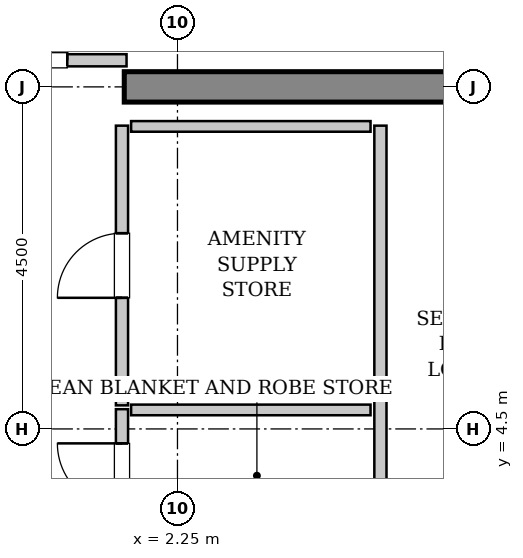
"""IFC4 building model, lengths in metres.
Left out: names, types, materials, properties, quantities, classifications, styles, units other than length and angle.
Written with IfcOpenShell. Run it as: python <this file> out.ifc"""

import sys

from ifc_helpers import new_model, si_unit, direction, frame, frame_2d, origin, place, context, subcontext, project, spatial, rectangle, extrude, source, transform, mapped, element, fill, save


model = new_model("IFC4")
c1 = context("Model", 3, precision=1e-05, world=origin(), true_north=direction((0.0, 1.0)))
c2 = subcontext(c1, "Body", "Model", "MODEL_VIEW")
j1 = project(units=[si_unit("LENGTHUNIT", "METRE"), si_unit("PLANEANGLEUNIT", "RADIAN")], contexts=[c1])
p1 = place(None, origin())
s1 = spatial("IfcSite", under=j1, at=p1, CompositionType="ELEMENT")
p2 = place(p1, origin())
s2 = spatial("IfcBuilding", under=s1, at=p2, CompositionType="ELEMENT")
p3 = place(p2, frame((0.0, 0.0, 345.2)))
s3 = spatial("IfcBuildingStorey", under=s2, at=p3, CompositionType="ELEMENT", Elevation=345.2)
m1 = source(origin(), c2, "Body", "SweptSolid", [
    extrude(rectangle(XDim=9.9, YDim=0.4, at=frame_2d((4.95, 0.0))), origin(), (0.0, 0.0, 1.0), 3.8),
])
p4 = place(p3, frame((1.55, 9.0, 0.0), z_axis=(0.0, 0.0, 1.0), x_axis=(1.0, 0.0, 0.0)))
e1 = element("IfcWall", 1, at=p4, inside=s3, PredefinedType="SHEAR", context=c2, shape_type="MappedRepresentation", body=[
    mapped(m1, transform((0.0, 0.0, 0.0), x_axis=(1.0, 0.0, 0.0), y_axis=(0.0, 1.0, 0.0), z_axis=(0.0, 0.0, 1.0), scale=1.0)),
])
m2 = source(origin(), c2, "Body", "SweptSolid", [
    extrude(rectangle(XDim=3.16, YDim=0.16, at=frame_2d((1.58, 0.0))), origin(), (0.0, 0.0, 1.0), 2.575),
])
p5 = place(p3, frame((-1.58, 9.35, 0.0), z_axis=(0.0, 0.0, 1.0), x_axis=(1.0, 0.0, 0.0)))
e2 = element("IfcWall", 2, at=p5, inside=s3, PredefinedType="PARTITIONING", context=c2, shape_type="MappedRepresentation", body=[
    mapped(m2, transform((0.0, 0.0, 0.0), x_axis=(1.0, 0.0, 0.0), y_axis=(0.0, 1.0, 0.0), z_axis=(0.0, 0.0, 1.0), scale=1.0)),
])
p6 = place(p5, frame((0.78, 0.0, 0.0)))
e3 = element("IfcOpeningElement", 3, at=p6, cuts=e2, PredefinedType="OPENING", context=c2, shape_type="SweptSolid", body=[
    extrude(rectangle(XDim=1.6, YDim=2.3, at=frame_2d((0.8, 1.15))), frame((0.0, 0.09, 0.0), z_axis=(0.0, -1.0, 0.0), x_axis=(1.0, 0.0, 0.0)), (0.0, 0.0, 1.0), 0.18),
])
m3 = source(origin(), c2, "Body", "SweptSolid", [
    extrude(rectangle(XDim=5.45, YDim=0.16, at=frame_2d((2.725, 0.0))), origin(), (0.0, 0.0, 1.0), 3.485),
])
p7 = place(p3, frame((4.92, 3.04, 0.0), z_axis=(0.0, 0.0, 1.0), x_axis=(0.0, 1.0, 0.0)))
e4 = element("IfcWall", 4, at=p7, inside=s3, PredefinedType="PARTITIONING", context=c2, shape_type="MappedRepresentation", body=[
    mapped(m3, transform((0.0, 0.0, 0.0), x_axis=(1.0, 0.0, 0.0), y_axis=(0.0, 1.0, 0.0), z_axis=(0.0, 0.0, 1.0), scale=1.0)),
])
m4 = source(origin(), c2, "Body", "SweptSolid", [
    extrude(rectangle(XDim=1.75, YDim=0.16, at=frame_2d((0.875, 0.0))), origin(), (0.0, 0.0, 1.0), 3.485),
])
p8 = place(p3, frame((1.52, 3.01, 0.0), z_axis=(0.0, 0.0, 1.0), x_axis=(0.0, 1.0, 0.0)))
e5 = element("IfcWall", 5, at=p8, inside=s3, PredefinedType="PARTITIONING", context=c2, shape_type="MappedRepresentation", body=[
    mapped(m4, transform((0.0, 0.0, 0.0), x_axis=(1.0, 0.0, 0.0), y_axis=(0.0, 1.0, 0.0), z_axis=(0.0, 0.0, 1.0), scale=1.0)),
])
p9 = place(p8, frame((0.45, 0.0, 0.0)))
e6 = element("IfcOpeningElement", 6, at=p9, cuts=e5, PredefinedType="OPENING", context=c2, shape_type="SweptSolid", body=[
    extrude(rectangle(XDim=0.85, YDim=2.1, at=frame_2d((0.425, 1.05))), frame((0.0, 0.09, 0.0), z_axis=(0.0, -1.0, 0.0), x_axis=(1.0, 0.0, 0.0)), (0.0, 0.0, 1.0), 0.18),
])
m5 = source(origin(), c2, "Body", "SweptSolid", [
    extrude(rectangle(XDim=3.15, YDim=0.14, at=frame_2d((1.575, 0.0))), origin(), (0.0, 0.0, 1.0), 3.485),
])
p10 = place(p3, frame((1.64, 4.75, 0.0), z_axis=(0.0, 0.0, 1.0), x_axis=(1.0, 0.0, 0.0)))
e7 = element("IfcWall", 7, at=p10, inside=s3, PredefinedType="PARTITIONING", context=c2, shape_type="MappedRepresentation", body=[
    mapped(m5, transform((0.0, 0.0, 0.0), x_axis=(1.0, 0.0, 0.0), y_axis=(0.0, 1.0, 0.0), z_axis=(0.0, 0.0, 1.0), scale=1.0)),
])
m6 = source(origin(), c2, "Body", "SweptSolid", [
    extrude(rectangle(XDim=3.68, YDim=0.16, at=frame_2d((1.84, 0.0))), origin(), (0.0, 0.0, 1.0), 3.485),
])
p11 = place(p3, frame((1.52, 4.81, 0.0), z_axis=(0.0, 0.0, 1.0), x_axis=(0.0, 1.0, 0.0)))
e8 = element("IfcWall", 8, at=p11, inside=s3, PredefinedType="PARTITIONING", context=c2, shape_type="MappedRepresentation", body=[
    mapped(m6, transform((0.0, 0.0, 0.0), x_axis=(1.0, 0.0, 0.0), y_axis=(0.0, 1.0, 0.0), z_axis=(0.0, 0.0, 1.0), scale=1.0)),
])
p12 = place(p11, frame((1.415, 0.0, 0.0)))
e9 = element("IfcOpeningElement", 9, at=p12, cuts=e8, PredefinedType="OPENING", context=c2, shape_type="SweptSolid", body=[
    extrude(rectangle(XDim=0.85, YDim=2.1, at=frame_2d((0.425, 1.05))), frame((0.0, 0.09, 0.0), z_axis=(0.0, -1.0, 0.0), x_axis=(1.0, 0.0, 0.0)), (0.0, 0.0, 1.0), 0.18),
])
p13 = place(p3, frame((1.64, 8.48, 0.0), z_axis=(0.0, 0.0, 1.0), x_axis=(1.0, 0.0, 0.0)))
e10 = element("IfcWall", 10, at=p13, inside=s3, PredefinedType="PARTITIONING", context=c2, shape_type="MappedRepresentation", body=[
    mapped(m5, transform((0.0, 0.0, 0.0), x_axis=(1.0, 0.0, 0.0), y_axis=(0.0, 1.0, 0.0), z_axis=(0.0, 0.0, 1.0), scale=1.0)),
])
m7 = source(origin(), c2, "Body", "SweptSolid", [
    extrude(rectangle(XDim=1.6, YDim=2.3, at=frame_2d((0.8, 1.15))), frame((0.0, 0.025, 0.0), z_axis=(0.0, -1.0, 0.0), x_axis=(1.0, 0.0, 0.0)), (0.0, 0.0, 1.0), 0.05),
])
p14 = place(p6, origin())
e11 = element("IfcDoor", 11, at=p14, inside=s3, OperationType="DOUBLE_DOOR_SINGLE_SWING", PredefinedType="DOOR", context=c2, shape_type="MappedRepresentation", body=[
    mapped(m7, transform((0.0, 0.0, 0.0), x_axis=(1.0, 0.0, 0.0), y_axis=(0.0, 1.0, 0.0), z_axis=(0.0, 0.0, 1.0), scale=1.0)),
])
fill(e3, e11)
m8 = source(origin(), c2, "Body", "SweptSolid", [
    extrude(rectangle(XDim=0.85, YDim=2.1, at=frame_2d((0.425, 1.05))), frame((0.0, 0.025, 0.0), z_axis=(0.0, -1.0, 0.0), x_axis=(1.0, 0.0, 0.0)), (0.0, 0.0, 1.0), 0.05),
])
p15 = place(p9, origin())
e12 = element("IfcDoor", 12, at=p15, inside=s3, OperationType="SINGLE_SWING_RIGHT", PredefinedType="DOOR", context=c2, shape_type="MappedRepresentation", body=[
    mapped(m8, transform((0.0, 0.0, 0.0), x_axis=(1.0, 0.0, 0.0), y_axis=(0.0, 1.0, 0.0), z_axis=(0.0, 0.0, 1.0), scale=1.0)),
])
fill(e6, e12)
p16 = place(p12, origin())
e13 = element("IfcDoor", 13, at=p16, inside=s3, OperationType="SINGLE_SWING_LEFT", PredefinedType="DOOR", context=c2, shape_type="MappedRepresentation", body=[
    mapped(m8, transform((0.0, 0.0, 0.0), x_axis=(1.0, 0.0, 0.0), y_axis=(0.0, 1.0, 0.0), z_axis=(0.0, 0.0, 1.0), scale=1.0)),
])
fill(e9, e13)
save(model, sys.argv[1])
